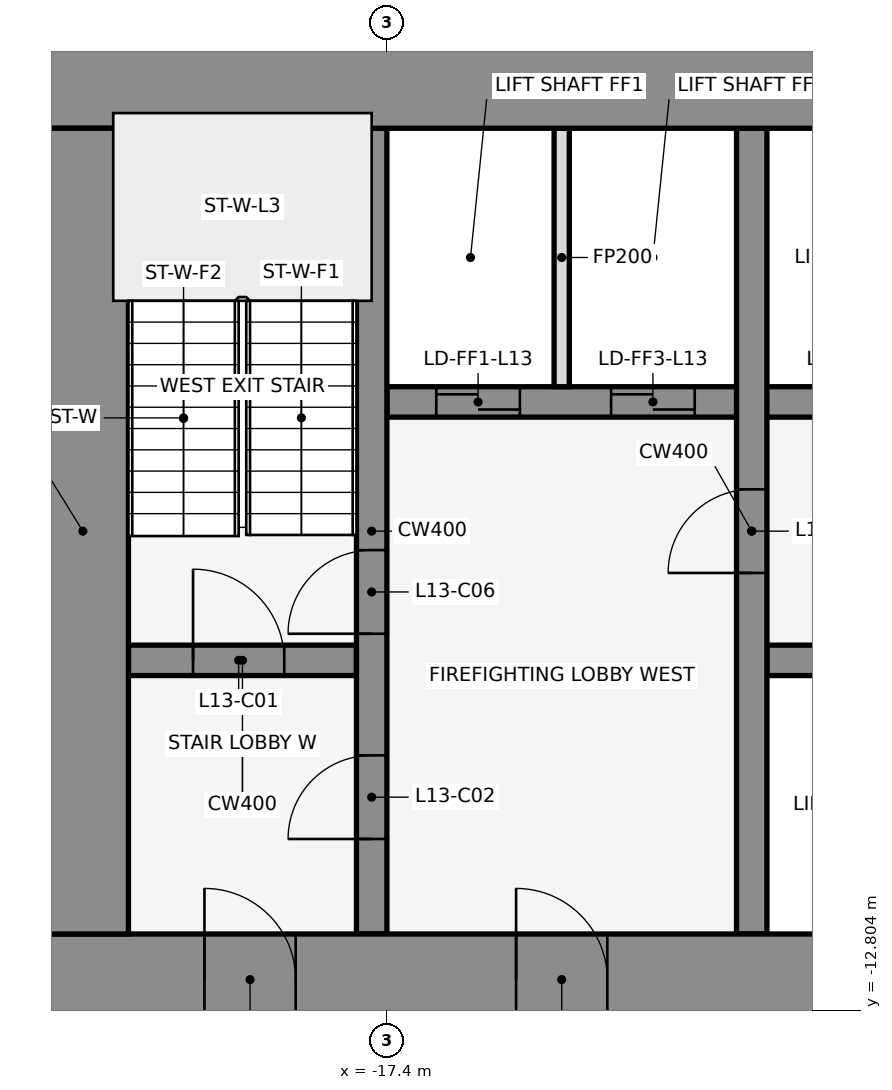
"""IFC4 building model, lengths in metres.
Left out: names, types, materials, properties, quantities, classifications, styles, units other than length and angle.
Written with IfcOpenShell. Run it as: python <this file> out.ifc"""

import sys

from ifc_helpers import new_model, si_unit, direction, frame, frame_2d, origin, place, context, subcontext, project, spatial, rectangle, extrude, element, fill, save


model = new_model("IFC4")
c1 = context("Model", 3, precision=1e-05, world=origin(), true_north=direction((0.0, 1.0)))
c2 = subcontext(c1, "Body", "Model", "MODEL_VIEW")
j1 = project(units=[si_unit("LENGTHUNIT", "METRE"), si_unit("PLANEANGLEUNIT", "RADIAN")], contexts=[c1])
p1 = place(None, origin())
s1 = spatial("IfcSite", under=j1, at=p1, CompositionType="ELEMENT")
p2 = place(p1, origin())
s2 = spatial("IfcBuilding", under=s1, at=p2, CompositionType="ELEMENT")
p3 = place(p2, frame((0.0, 0.0, 66.5)))
s3 = spatial("IfcBuildingStorey", under=s2, at=p3, CompositionType="ELEMENT", Elevation=66.5)
p4 = place(p3, frame((-14.599, 1.08, 0.0), z_axis=(0.0, 0.0, 1.0), x_axis=(-0.83981312244, -0.542875602121, 0.0)))
e1 = element("IfcWall", 1, at=p4, inside=s3, PredefinedType="STANDARD", context=c2, shape_type="SweptSolid", body=[
    extrude(rectangle(XDim=2.183, YDim=0.25, at=frame_2d((1.091, 0.0))), origin(), (0.0, 0.0, 1.0), 4.35),
])
p5 = place(p3, frame((-20.8, -8.2, 0.0), z_axis=(0.0, 0.0, 1.0), x_axis=(1.0, 0.0, 0.0)))
e2 = element("IfcWall", 2, at=p5, inside=s3, PredefinedType="SHEAR", context=c2, shape_type="SweptSolid", body=[
    extrude(rectangle(XDim=3.0, YDim=0.4, at=frame_2d((1.5, 0.0))), origin(), (0.0, 0.0, 1.0), 4.5),
])
p6 = place(p5, frame((0.85, 0.0, 0.0)))
e3 = element("IfcOpeningElement", 3, at=p6, cuts=e2, PredefinedType="OPENING", context=c2, shape_type="SweptSolid", body=[
    extrude(rectangle(XDim=1.2, YDim=2.1, at=frame_2d((0.6, 1.05))), frame((0.0, 0.212, 0.0), z_axis=(0.0, -1.0, 0.0), x_axis=(1.0, 0.0, 0.0)), (0.0, 0.0, 1.0), 0.424),
])
p7 = place(p3, frame((-12.4, -8.2, 0.0), z_axis=(0.0, 0.0, 1.0), x_axis=(1.0, 0.0, 0.0)))
e4 = element("IfcWall", 4, at=p7, inside=s3, PredefinedType="SHEAR", context=c2, shape_type="SweptSolid", body=[
    extrude(rectangle(XDim=6.0, YDim=0.4, at=frame_2d((3.0, 0.0))), origin(), (0.0, 0.0, 1.0), 4.5),
])
p8 = place(p3, frame((-17.4, -4.8, 0.0), z_axis=(0.0, 0.0, 1.0), x_axis=(1.0, 0.0, 0.0)))
e5 = element("IfcWall", 5, at=p8, inside=s3, PredefinedType="SHEAR", context=c2, shape_type="SweptSolid", body=[
    extrude(rectangle(XDim=13.6, YDim=0.4, at=frame_2d((6.8, 0.0))), origin(), (0.0, 0.0, 1.0), 4.5),
])
p9 = place(p8, frame((0.65, 0.0, 0.0)))
e6 = element("IfcOpeningElement", 6, at=p9, cuts=e5, PredefinedType="OPENING", context=c2, shape_type="SweptSolid", body=[
    extrude(rectangle(XDim=1.1, YDim=2.1, at=frame_2d((0.55, 1.05))), frame((0.0, 0.212, 0.0), z_axis=(0.0, -1.0, 0.0), x_axis=(1.0, 0.0, 0.0)), (0.0, 0.0, 1.0), 0.424),
])
p10 = place(p8, frame((2.95, 0.0, 0.0)))
e7 = element("IfcOpeningElement", 7, at=p10, cuts=e5, PredefinedType="OPENING", context=c2, shape_type="SweptSolid", body=[
    extrude(rectangle(XDim=1.1, YDim=2.1, at=frame_2d((0.55, 1.05))), frame((0.0, 0.212, 0.0), z_axis=(0.0, -1.0, 0.0), x_axis=(1.0, 0.0, 0.0)), (0.0, 0.0, 1.0), 0.424),
])
p11 = place(p8, frame((5.65, 0.0, 0.0)))
e8 = element("IfcOpeningElement", 8, at=p11, cuts=e5, PredefinedType="OPENING", context=c2, shape_type="SweptSolid", body=[
    extrude(rectangle(XDim=1.2, YDim=2.1, at=frame_2d((0.6, 1.05))), frame((0.0, 0.212, 0.0), z_axis=(0.0, -1.0, 0.0), x_axis=(1.0, 0.0, 0.0)), (0.0, 0.0, 1.0), 0.424),
])
p12 = place(p8, frame((8.65, 0.0, 0.0)))
e9 = element("IfcOpeningElement", 9, at=p12, cuts=e5, PredefinedType="OPENING", context=c2, shape_type="SweptSolid", body=[
    extrude(rectangle(XDim=1.2, YDim=2.1, at=frame_2d((0.6, 1.05))), frame((0.0, 0.212, 0.0), z_axis=(0.0, -1.0, 0.0), x_axis=(1.0, 0.0, 0.0)), (0.0, 0.0, 1.0), 0.424),
])
p13 = place(p8, frame((11.65, 0.0, 0.0)))
e10 = element("IfcOpeningElement", 10, at=p13, cuts=e5, PredefinedType="OPENING", context=c2, shape_type="SweptSolid", body=[
    extrude(rectangle(XDim=1.2, YDim=2.1, at=frame_2d((0.6, 1.05))), frame((0.0, 0.212, 0.0), z_axis=(0.0, -1.0, 0.0), x_axis=(1.0, 0.0, 0.0)), (0.0, 0.0, 1.0), 0.424),
])
p14 = place(p3, frame((-17.6, -11.8, 0.0), z_axis=(0.0, 0.0, 1.0), x_axis=(0.0, 1.0, 0.0)))
e11 = element("IfcWall", 11, at=p14, inside=s3, PredefinedType="SHEAR", context=c2, shape_type="SweptSolid", body=[
    extrude(rectangle(XDim=10.6, YDim=0.4, at=frame_2d((5.3, 0.0))), origin(), (0.0, 0.0, 1.0), 4.5),
])
p15 = place(p14, frame((1.25, 0.0, 0.0)))
e12 = element("IfcOpeningElement", 12, at=p15, cuts=e11, PredefinedType="OPENING", context=c2, shape_type="SweptSolid", body=[
    extrude(rectangle(XDim=1.1, YDim=2.1, at=frame_2d((0.55, 1.05))), frame((0.0, 0.212, 0.0), z_axis=(0.0, -1.0, 0.0), x_axis=(1.0, 0.0, 0.0)), (0.0, 0.0, 1.0), 0.424),
])
p16 = place(p14, frame((3.95, 0.0, 0.0)))
e13 = element("IfcOpeningElement", 13, at=p16, cuts=e11, PredefinedType="OPENING", context=c2, shape_type="SweptSolid", body=[
    extrude(rectangle(XDim=1.1, YDim=2.1, at=frame_2d((0.55, 1.05))), frame((0.0, 0.212, 0.0), z_axis=(0.0, -1.0, 0.0), x_axis=(1.0, 0.0, 0.0)), (0.0, 0.0, 1.0), 0.424),
])
p17 = place(p3, frame((-15.1, -4.6, 0.0), z_axis=(0.0, 0.0, 1.0), x_axis=(0.0, 1.0, 0.0)))
e14 = element("IfcWall", 14, at=p17, inside=s3, PredefinedType="PARTITIONING", context=c2, shape_type="SweptSolid", body=[
    extrude(rectangle(XDim=3.4, YDim=0.2, at=frame_2d((1.7, 0.0))), origin(), (0.0, 0.0, 1.0), 3.418),
])
p18 = place(p3, frame((-12.6, -11.8, 0.0), z_axis=(0.0, 0.0, 1.0), x_axis=(0.0, 1.0, 0.0)))
e15 = element("IfcWall", 15, at=p18, inside=s3, PredefinedType="SHEAR", context=c2, shape_type="SweptSolid", body=[
    extrude(rectangle(XDim=10.6, YDim=0.4, at=frame_2d((5.3, 0.0))), origin(), (0.0, 0.0, 1.0), 4.5),
])
p19 = place(p18, frame((4.75, 0.0, 0.0)))
e16 = element("IfcOpeningElement", 16, at=p19, cuts=e15, PredefinedType="OPENING", context=c2, shape_type="SweptSolid", body=[
    extrude(rectangle(XDim=1.1, YDim=2.1, at=frame_2d((0.55, 1.05))), frame((0.0, 0.212, 0.0), z_axis=(0.0, -1.0, 0.0), x_axis=(1.0, 0.0, 0.0)), (0.0, 0.0, 1.0), 0.424),
])
p20 = place(p3, frame((-22.0, -0.6, 0.0), z_axis=(0.0, 0.0, 1.0), x_axis=(1.0, 0.0, 0.0)))
e17 = element("IfcWall", 17, at=p20, inside=s3, PredefinedType="SHEAR", context=c2, shape_type="SweptSolid", body=[
    extrude(rectangle(XDim=44.0, YDim=1.2, at=frame_2d((22.0, 0.0))), origin(), (0.0, 0.0, 1.0), 4.5),
])
p21 = place(p20, frame((18.55, 0.0, 0.0)))
e18 = element("IfcOpeningElement", 18, at=p21, cuts=e17, PredefinedType="OPENING", context=c2, shape_type="SweptSolid", body=[
    extrude(rectangle(XDim=0.9, YDim=2.1, at=frame_2d((0.45, 1.05))), frame((0.0, 0.612, 0.0), z_axis=(0.0, -1.0, 0.0), x_axis=(1.0, 0.0, 0.0)), (0.0, 0.0, 1.0), 1.224),
])
p22 = place(p20, frame((24.55, 0.0, 0.0)))
e19 = element("IfcOpeningElement", 19, at=p22, cuts=e17, PredefinedType="OPENING", context=c2, shape_type="SweptSolid", body=[
    extrude(rectangle(XDim=0.9, YDim=2.1, at=frame_2d((0.45, 1.05))), frame((0.0, 0.612, 0.0), z_axis=(0.0, -1.0, 0.0), x_axis=(1.0, 0.0, 0.0)), (0.0, 0.0, 1.0), 1.224),
])
p23 = place(p3, frame((-22.0, -12.4, 0.0), z_axis=(0.0, 0.0, 1.0), x_axis=(1.0, 0.0, 0.0)))
e20 = element("IfcWall", 20, at=p23, inside=s3, PredefinedType="SHEAR", context=c2, shape_type="SweptSolid", body=[
    extrude(rectangle(XDim=44.0, YDim=1.2, at=frame_2d((22.0, 0.0))), origin(), (0.0, 0.0, 1.0), 4.5),
])
p24 = place(p23, frame((2.2, 0.0, 0.0)))
e21 = element("IfcOpeningElement", 21, at=p24, cuts=e20, PredefinedType="OPENING", context=c2, shape_type="SweptSolid", body=[
    extrude(rectangle(XDim=1.2, YDim=2.1, at=frame_2d((0.6, 1.05))), frame((0.0, 0.612, 0.0), z_axis=(0.0, -1.0, 0.0), x_axis=(1.0, 0.0, 0.0)), (0.0, 0.0, 1.0), 1.224),
])
p25 = place(p23, frame((21.4, 0.0, 0.0)))
e22 = element("IfcOpeningElement", 22, at=p25, cuts=e20, PredefinedType="OPENING", context=c2, shape_type="SweptSolid", body=[
    extrude(rectangle(XDim=1.2, YDim=2.1, at=frame_2d((0.6, 1.05))), frame((0.0, 0.612, 0.0), z_axis=(0.0, -1.0, 0.0), x_axis=(1.0, 0.0, 0.0)), (0.0, 0.0, 1.0), 1.224),
])
p26 = place(p23, frame((40.6, 0.0, 0.0)))
e23 = element("IfcOpeningElement", 23, at=p26, cuts=e20, PredefinedType="OPENING", context=c2, shape_type="SweptSolid", body=[
    extrude(rectangle(XDim=1.2, YDim=2.1, at=frame_2d((0.6, 1.05))), frame((0.0, 0.612, 0.0), z_axis=(0.0, -1.0, 0.0), x_axis=(1.0, 0.0, 0.0)), (0.0, 0.0, 1.0), 1.224),
])
p27 = place(p23, frame((16.0, 0.0, 0.0)))
e24 = element("IfcOpeningElement", 24, at=p27, cuts=e20, PredefinedType="OPENING", context=c2, shape_type="SweptSolid", body=[
    extrude(rectangle(XDim=1.8, YDim=2.1, at=frame_2d((0.9, 1.05))), frame((0.0, 0.612, 0.0), z_axis=(0.0, -1.0, 0.0), x_axis=(1.0, 0.0, 0.0)), (0.0, 0.0, 1.0), 1.224),
])
p28 = place(p23, frame((6.3, 0.0, 0.0)))
e25 = element("IfcOpeningElement", 25, at=p28, cuts=e20, PredefinedType="OPENING", context=c2, shape_type="SweptSolid", body=[
    extrude(rectangle(XDim=1.2, YDim=2.1, at=frame_2d((0.6, 1.05))), frame((0.0, 0.612, 0.0), z_axis=(0.0, -1.0, 0.0), x_axis=(1.0, 0.0, 0.0)), (0.0, 0.0, 1.0), 1.224),
])
p29 = place(p23, frame((26.2, 0.0, 0.0)))
e26 = element("IfcOpeningElement", 26, at=p29, cuts=e20, PredefinedType="OPENING", context=c2, shape_type="SweptSolid", body=[
    extrude(rectangle(XDim=1.8, YDim=2.1, at=frame_2d((0.9, 1.05))), frame((0.0, 0.612, 0.0), z_axis=(0.0, -1.0, 0.0), x_axis=(1.0, 0.0, 0.0)), (0.0, 0.0, 1.0), 1.224),
])
p30 = place(p23, frame((36.5, 0.0, 0.0)))
e27 = element("IfcOpeningElement", 27, at=p30, cuts=e20, PredefinedType="OPENING", context=c2, shape_type="SweptSolid", body=[
    extrude(rectangle(XDim=1.2, YDim=2.1, at=frame_2d((0.6, 1.05))), frame((0.0, 0.612, 0.0), z_axis=(0.0, -1.0, 0.0), x_axis=(1.0, 0.0, 0.0)), (0.0, 0.0, 1.0), 1.224),
])
p31 = place(p3, frame((-21.4, -11.8, 0.0), z_axis=(0.0, 0.0, 1.0), x_axis=(0.0, 1.0, 0.0)))
e28 = element("IfcWall", 28, at=p31, inside=s3, PredefinedType="SHEAR", context=c2, shape_type="SweptSolid", body=[
    extrude(rectangle(XDim=10.6, YDim=1.2, at=frame_2d((5.3, 0.0))), origin(), (0.0, 0.0, 1.0), 4.5),
])
p32 = place(p6, origin())
e29 = element("IfcDoor", 29, at=p32, inside=s3, OperationType="SINGLE_SWING_LEFT", PredefinedType="DOOR", context=c2, shape_type="SweptSolid", body=[
    extrude(rectangle(XDim=1.2, YDim=2.1, at=frame_2d((0.6, 1.05))), frame((0.0, 0.025, 0.0), z_axis=(0.0, -1.0, 0.0), x_axis=(1.0, 0.0, 0.0)), (0.0, 0.0, 1.0), 0.05),
])
fill(e3, e29)
p33 = place(p15, frame((1.1, 0.0, 0.0), z_axis=(0.0, 0.0, 1.0), x_axis=(-1.0, 0.0, 0.0)))
e30 = element("IfcDoor", 30, at=p33, inside=s3, OperationType="SINGLE_SWING_LEFT", PredefinedType="DOOR", context=c2, shape_type="SweptSolid", body=[
    extrude(rectangle(XDim=1.1, YDim=2.1, at=frame_2d((0.55, 1.05))), frame((0.0, 0.025, 0.0), z_axis=(0.0, -1.0, 0.0), x_axis=(1.0, 0.0, 0.0)), (0.0, 0.0, 1.0), 0.05),
])
fill(e12, e30)
p34 = place(p9, origin())
e31 = element("IfcDoor", 31, at=p34, inside=s3, OperationType="DOUBLE_DOOR_SLIDING", PredefinedType="DOOR", context=c2, shape_type="SweptSolid", body=[
    extrude(rectangle(XDim=1.1, YDim=2.1, at=frame_2d((0.55, 1.05))), frame((0.0, 0.025, 0.0), z_axis=(0.0, -1.0, 0.0), x_axis=(1.0, 0.0, 0.0)), (0.0, 0.0, 1.0), 0.05),
])
fill(e6, e31)
p35 = place(p10, origin())
e32 = element("IfcDoor", 32, at=p35, inside=s3, OperationType="DOUBLE_DOOR_SLIDING", PredefinedType="DOOR", context=c2, shape_type="SweptSolid", body=[
    extrude(rectangle(XDim=1.1, YDim=2.1, at=frame_2d((0.55, 1.05))), frame((0.0, 0.025, 0.0), z_axis=(0.0, -1.0, 0.0), x_axis=(1.0, 0.0, 0.0)), (0.0, 0.0, 1.0), 0.05),
])
fill(e7, e32)
p36 = place(p16, frame((1.1, 0.0, 0.0), z_axis=(0.0, 0.0, 1.0), x_axis=(-1.0, 0.0, 0.0)))
e33 = element("IfcDoor", 33, at=p36, inside=s3, OperationType="SINGLE_SWING_LEFT", PredefinedType="DOOR", context=c2, shape_type="SweptSolid", body=[
    extrude(rectangle(XDim=1.1, YDim=2.1, at=frame_2d((0.55, 1.05))), frame((0.0, 0.025, 0.0), z_axis=(0.0, -1.0, 0.0), x_axis=(1.0, 0.0, 0.0)), (0.0, 0.0, 1.0), 0.05),
])
fill(e13, e33)
p37 = place(p19, origin())
e34 = element("IfcDoor", 34, at=p37, inside=s3, OperationType="SINGLE_SWING_LEFT", PredefinedType="DOOR", context=c2, shape_type="SweptSolid", body=[
    extrude(rectangle(XDim=1.1, YDim=2.1, at=frame_2d((0.55, 1.05))), frame((0.0, 0.025, 0.0), z_axis=(0.0, -1.0, 0.0), x_axis=(1.0, 0.0, 0.0)), (0.0, 0.0, 1.0), 0.05),
])
fill(e16, e34)
p38 = place(p24, frame((1.2, 0.0, 0.0), z_axis=(0.0, 0.0, 1.0), x_axis=(-1.0, 0.0, 0.0)))
e35 = element("IfcDoor", 35, at=p38, inside=s3, OperationType="SINGLE_SWING_RIGHT", PredefinedType="DOOR", context=c2, shape_type="SweptSolid", body=[
    extrude(rectangle(XDim=1.2, YDim=2.1, at=frame_2d((0.6, 1.05))), frame((0.0, 0.025, 0.0), z_axis=(0.0, -1.0, 0.0), x_axis=(1.0, 0.0, 0.0)), (0.0, 0.0, 1.0), 0.05),
])
fill(e21, e35)
p39 = place(p28, frame((1.2, 0.0, 0.0), z_axis=(0.0, 0.0, 1.0), x_axis=(-1.0, 0.0, 0.0)))
e36 = element("IfcDoor", 36, at=p39, inside=s3, OperationType="SINGLE_SWING_RIGHT", PredefinedType="DOOR", context=c2, shape_type="SweptSolid", body=[
    extrude(rectangle(XDim=1.2, YDim=2.1, at=frame_2d((0.6, 1.05))), frame((0.0, 0.025, 0.0), z_axis=(0.0, -1.0, 0.0), x_axis=(1.0, 0.0, 0.0)), (0.0, 0.0, 1.0), 0.05),
])
fill(e25, e36)
save(model, sys.argv[1])
